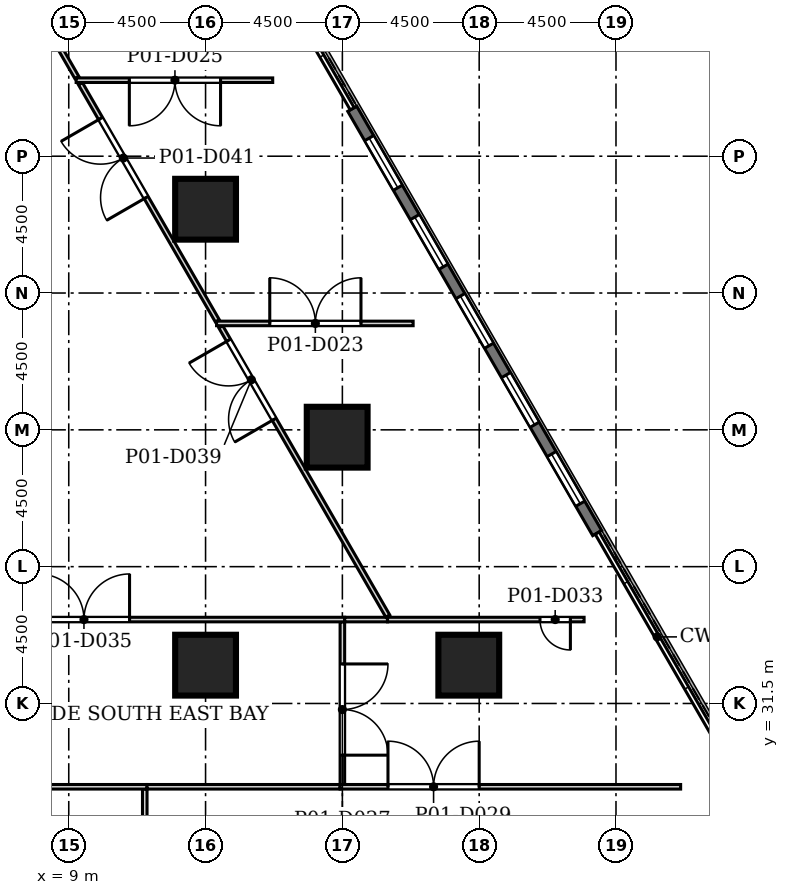
"""IFC4 building model, lengths in metres.
Left out: names, types, materials, properties, quantities, classifications, styles, units other than length and angle.
Written with IfcOpenShell. Run it as: python <this file> out.ifc"""

import sys

from ifc_helpers import new_model, si_unit, direction, frame, frame_2d, origin, origin_2d, place, context, subcontext, project, spatial, rectangle, extrude, element, fill, save


model = new_model("IFC4")
c1 = context("Model", 3, precision=1e-05, world=origin(), true_north=direction((0.0, 1.0)))
c2 = subcontext(c1, "Body", "Model", "MODEL_VIEW")
j1 = project(units=[si_unit("LENGTHUNIT", "METRE"), si_unit("PLANEANGLEUNIT", "RADIAN")], contexts=[c1])
p1 = place(None, origin())
s1 = spatial("IfcSite", under=j1, at=p1, CompositionType="ELEMENT")
p2 = place(p1, origin())
s2 = spatial("IfcBuilding", under=s1, at=p2, CompositionType="ELEMENT")
p3 = place(p2, frame((0.0, 0.0, 8.0)))
s3 = spatial("IfcBuildingStorey", under=s2, at=p3, CompositionType="ELEMENT", Elevation=8.0)
for number, where, z_axis, x_axis in (
    (1, (22.158, 32.76, 0.0), (0.0, 0.0, 1.0), (1.0, 0.0, 0.0)),
    (2, (13.5, 47.756, 0.0), (0.0, 0.0, 1.0), (1.0, 0.0, 0.0)),
    (3, (13.5, 32.76, 0.0), (0.0, 0.0, 1.0), (1.0, 0.0, 0.0)),
    (4, (17.829, 40.258, 0.0), (0.0, 0.0, 1.0), (1.0, 0.0, 0.0)),
):
    element("IfcColumn", number, at=place(p3, frame(where, z_axis=z_axis, x_axis=x_axis)), inside=s3, PredefinedType="COLUMN", context=c2, shape_type="SweptSolid", body=[
        extrude(rectangle(XDim=2.0, YDim=2.0, at=origin_2d()), origin(), (0.0, 0.0, 1.0), 6.0),
    ])
p4 = place(p3, frame((26.382, 37.104, 0.0), z_axis=(0.0, 0.0, 1.0), x_axis=(-0.500003967864, 0.866023112925, 0.0)))
e5 = element("IfcWall", 5, at=p4, inside=s3, PredefinedType="SOLIDWALL", context=c2, shape_type="SweptSolid", body=[
    extrude(rectangle(XDim=16.115, YDim=0.34, at=frame_2d((8.058, 0.0))), origin(), (0.0, 0.0, 1.0), 5.7),
])
p5 = place(p4, frame((1.115, 0.0, 0.9)))
e6 = element("IfcOpeningElement", 6, at=p5, cuts=e5, PredefinedType="OPENING", context=c2, shape_type="SweptSolid", body=[
    extrude(rectangle(XDim=1.885, YDim=3.5, at=frame_2d((0.942, 1.75))), frame((0.0, 0.18, 0.0), z_axis=(0.0, -1.0, 0.0), x_axis=(1.0, 0.0, 0.0)), (0.0, 0.0, 1.0), 0.36),
])
p6 = place(p4, frame((4.115, 0.0, 0.9)))
e7 = element("IfcOpeningElement", 7, at=p6, cuts=e5, PredefinedType="OPENING", context=c2, shape_type="SweptSolid", body=[
    extrude(rectangle(XDim=1.885, YDim=3.5, at=frame_2d((0.942, 1.75))), frame((0.0, 0.18, 0.0), z_axis=(0.0, -1.0, 0.0), x_axis=(1.0, 0.0, 0.0)), (0.0, 0.0, 1.0), 0.36),
])
p7 = place(p4, frame((7.115, 0.0, 0.9)))
e8 = element("IfcOpeningElement", 8, at=p7, cuts=e5, PredefinedType="OPENING", context=c2, shape_type="SweptSolid", body=[
    extrude(rectangle(XDim=1.885, YDim=3.5, at=frame_2d((0.942, 1.75))), frame((0.0, 0.18, 0.0), z_axis=(0.0, -1.0, 0.0), x_axis=(1.0, 0.0, 0.0)), (0.0, 0.0, 1.0), 0.36),
])
p8 = place(p4, frame((10.115, 0.0, 0.9)))
e9 = element("IfcOpeningElement", 9, at=p8, cuts=e5, PredefinedType="OPENING", context=c2, shape_type="SweptSolid", body=[
    extrude(rectangle(XDim=1.885, YDim=3.5, at=frame_2d((0.942, 1.75))), frame((0.0, 0.18, 0.0), z_axis=(0.0, -1.0, 0.0), x_axis=(1.0, 0.0, 0.0)), (0.0, 0.0, 1.0), 0.36),
])
p9 = place(p4, frame((13.115, 0.0, 0.9)))
e10 = element("IfcOpeningElement", 10, at=p9, cuts=e5, PredefinedType="OPENING", context=c2, shape_type="SweptSolid", body=[
    extrude(rectangle(XDim=1.885, YDim=3.5, at=frame_2d((0.942, 1.75))), frame((0.0, 0.18, 0.0), z_axis=(0.0, -1.0, 0.0), x_axis=(1.0, 0.0, 0.0)), (0.0, 0.0, 1.0), 0.36),
])
p10 = place(p3, frame((11.5, 28.685, 0.0), z_axis=(0.0, 0.0, 1.0), x_axis=(0.0, -1.0, 0.0)))
e11 = element("IfcWall", 11, at=p10, inside=s3, PredefinedType="PARTITIONING", context=c2, shape_type="SweptSolid", body=[
    extrude(rectangle(XDim=5.76, YDim=0.15, at=frame_2d((2.88, 0.0))), origin(), (0.0, 0.0, 1.0), 5.7),
])
p11 = place(p10, frame((1.185, 0.0, 0.0)))
e12 = element("IfcOpeningElement", 12, at=p11, cuts=e11, PredefinedType="OPENING", context=c2, shape_type="SweptSolid", body=[
    extrude(rectangle(XDim=3.0, YDim=2.4, at=frame_2d((1.5, 1.2))), frame((0.0, 0.085, 0.0), z_axis=(0.0, -1.0, 0.0), x_axis=(1.0, 0.0, 0.0)), (0.0, 0.0, 1.0), 0.17),
])
p12 = place(p3, frame((4.105, 28.76, 0.0), z_axis=(0.0, 0.0, 1.0), x_axis=(1.0, 0.0, 0.0)))
e13 = element("IfcWall", 13, at=p12, inside=s3, PredefinedType="PARTITIONING", context=c2, shape_type="SweptSolid", body=[
    extrude(rectangle(XDim=7.47, YDim=0.15, at=frame_2d((3.735, 0.0))), origin(), (0.0, 0.0, 1.0), 5.7),
])
p13 = place(p12, frame((0.395, 0.0, 0.0)))
e14 = element("IfcOpeningElement", 14, at=p13, cuts=e13, PredefinedType="OPENING", context=c2, shape_type="SweptSolid", body=[
    extrude(rectangle(XDim=3.0, YDim=2.4, at=frame_2d((1.5, 1.2))), frame((0.0, 0.085, 0.0), z_axis=(0.0, -1.0, 0.0), x_axis=(1.0, 0.0, 0.0)), (0.0, 0.0, 1.0), 0.17),
])
p14 = place(p3, frame((11.575, 28.76, 0.0), z_axis=(0.0, 0.0, 1.0), x_axis=(1.0, 0.0, 0.0)))
e15 = element("IfcWall", 15, at=p14, inside=s3, PredefinedType="PARTITIONING", context=c2, shape_type="SweptSolid", body=[
    extrude(rectangle(XDim=6.35, YDim=0.15, at=frame_2d((3.175, 0.0))), origin(), (0.0, 0.0, 1.0), 5.7),
])
p15 = place(p3, frame((17.925, 28.76, 0.0), z_axis=(0.0, 0.0, 1.0), x_axis=(1.0, 0.0, 0.0)))
e16 = element("IfcWall", 16, at=p15, inside=s3, PredefinedType="PARTITIONING", context=c2, shape_type="SweptSolid", body=[
    extrude(rectangle(XDim=11.201, YDim=0.15, at=frame_2d((5.601, 0.0))), origin(), (0.0, 0.0, 1.0), 5.7),
])
p16 = place(p15, frame((1.575, 0.0, 0.0)))
e17 = element("IfcOpeningElement", 17, at=p16, cuts=e16, PredefinedType="OPENING", context=c2, shape_type="SweptSolid", body=[
    extrude(rectangle(XDim=3.0, YDim=2.4, at=frame_2d((1.5, 1.2))), frame((0.0, 0.085, 0.0), z_axis=(0.0, -1.0, 0.0), x_axis=(1.0, 0.0, 0.0)), (0.0, 0.0, 1.0), 0.17),
])
p17 = place(p3, frame((18.0, 28.835, 0.0), z_axis=(0.0, 0.0, 1.0), x_axis=(0.0, 1.0, 0.0)))
e18 = element("IfcWall", 18, at=p17, inside=s3, PredefinedType="PARTITIONING", context=c2, shape_type="SweptSolid", body=[
    extrude(rectangle(XDim=5.35, YDim=0.15, at=frame_2d((2.675, 0.0))), origin(), (0.0, 0.0, 1.0), 5.7),
])
p18 = place(p17, frame((0.965, 0.0, 0.0)))
e19 = element("IfcOpeningElement", 19, at=p18, cuts=e18, PredefinedType="OPENING", context=c2, shape_type="SweptSolid", body=[
    extrude(rectangle(XDim=3.0, YDim=2.4, at=frame_2d((1.5, 1.2))), frame((0.0, 0.085, 0.0), z_axis=(0.0, -1.0, 0.0), x_axis=(1.0, 0.0, 0.0)), (0.0, 0.0, 1.0), 0.17),
])
p19 = place(p3, frame((18.075, 34.26, 0.0), z_axis=(0.0, 0.0, 1.0), x_axis=(-1.0, 0.0, 0.0)))
e20 = element("IfcWall", 20, at=p19, inside=s3, PredefinedType="PARTITIONING", context=c2, shape_type="SweptSolid", body=[
    extrude(rectangle(XDim=13.97, YDim=0.15, at=frame_2d((6.985, 0.0))), origin(), (0.0, 0.0, 1.0), 5.7),
])
p20 = place(p19, frame((7.075, 0.0, 0.0)))
e21 = element("IfcOpeningElement", 21, at=p20, cuts=e20, PredefinedType="OPENING", context=c2, shape_type="SweptSolid", body=[
    extrude(rectangle(XDim=3.0, YDim=2.4, at=frame_2d((1.5, 1.2))), frame((0.0, 0.085, 0.0), z_axis=(0.0, -1.0, 0.0), x_axis=(1.0, 0.0, 0.0)), (0.0, 0.0, 1.0), 0.17),
])
p21 = place(p19, frame((10.575, 0.0, 0.0)))
e22 = element("IfcOpeningElement", 22, at=p21, cuts=e20, PredefinedType="OPENING", context=c2, shape_type="SweptSolid", body=[
    extrude(rectangle(XDim=3.0, YDim=2.4, at=frame_2d((1.5, 1.2))), frame((0.0, 0.085, 0.0), z_axis=(0.0, -1.0, 0.0), x_axis=(1.0, 0.0, 0.0)), (0.0, 0.0, 1.0), 0.17),
])
p22 = place(p3, frame((19.485, 34.26, 0.0), z_axis=(0.0, 0.0, 1.0), x_axis=(-1.0, 0.0, 0.0)))
e23 = element("IfcWall", 23, at=p22, inside=s3, PredefinedType="PARTITIONING", context=c2, shape_type="SweptSolid", body=[
    extrude(rectangle(XDim=1.41, YDim=0.15, at=frame_2d((0.705, 0.0))), origin(), (0.0, 0.0, 1.0), 5.7),
])
p23 = place(p3, frame((19.485, 34.26, 0.0), z_axis=(0.0, 0.0, 1.0), x_axis=(1.0, 0.0, 0.0)))
e24 = element("IfcWall", 24, at=p23, inside=s3, PredefinedType="PARTITIONING", context=c2, shape_type="SweptSolid", body=[
    extrude(rectangle(XDim=6.466, YDim=0.15, at=frame_2d((3.233, 0.0))), origin(), (0.0, 0.0, 1.0), 5.7),
])
p24 = place(p23, frame((5.015, 0.0, 0.0)))
e25 = element("IfcOpeningElement", 25, at=p24, cuts=e24, PredefinedType="OPENING", context=c2, shape_type="SweptSolid", body=[
    extrude(rectangle(XDim=1.0, YDim=2.1, at=frame_2d((0.5, 1.05))), frame((0.0, 0.085, 0.0), z_axis=(0.0, -1.0, 0.0), x_axis=(1.0, 0.0, 0.0)), (0.0, 0.0, 1.0), 0.17),
])
p25 = place(p3, frame((14.001, 43.887, 0.0), z_axis=(0.0, 0.0, 1.0), x_axis=(0.500006534994, -0.866021630771, 0.0)))
e26 = element("IfcWall", 26, at=p25, inside=s3, PredefinedType="PARTITIONING", context=c2, shape_type="SweptSolid", body=[
    extrude(rectangle(XDim=10.985, YDim=0.15, at=frame_2d((5.493, 0.0))), origin(), (0.0, 0.0, 1.0), 5.7),
])
p26 = place(p25, frame((0.511, 0.0, 0.0)))
e27 = element("IfcOpeningElement", 27, at=p26, cuts=e26, PredefinedType="OPENING", context=c2, shape_type="SweptSolid", body=[
    extrude(rectangle(XDim=3.0, YDim=2.4, at=frame_2d((1.5, 1.2))), frame((0.0, 0.085, 0.0), z_axis=(0.0, -1.0, 0.0), x_axis=(1.0, 0.0, 0.0)), (0.0, 0.0, 1.0), 0.17),
])
p27 = place(p3, frame((13.861, 44.0, 0.0), z_axis=(0.0, 0.0, 1.0), x_axis=(1.0, 0.0, 0.0)))
e28 = element("IfcWall", 28, at=p27, inside=s3, PredefinedType="PARTITIONING", context=c2, shape_type="SweptSolid", body=[
    extrude(rectangle(XDim=6.466, YDim=0.15, at=frame_2d((3.233, 0.0))), origin(), (0.0, 0.0, 1.0), 5.7),
])
p28 = place(p27, frame((1.75, 0.0, 0.0)))
e29 = element("IfcOpeningElement", 29, at=p28, cuts=e28, PredefinedType="OPENING", context=c2, shape_type="SweptSolid", body=[
    extrude(rectangle(XDim=3.0, YDim=2.4, at=frame_2d((1.5, 1.2))), frame((0.0, 0.085, 0.0), z_axis=(0.0, -1.0, 0.0), x_axis=(1.0, 0.0, 0.0)), (0.0, 0.0, 1.0), 0.17),
])
p29 = place(p3, frame((9.383, 51.887, 0.0), z_axis=(0.0, 0.0, 1.0), x_axis=(0.499987617168, -0.866032552898, 0.0)))
e30 = element("IfcWall", 30, at=p29, inside=s3, PredefinedType="PARTITIONING", context=c2, shape_type="SweptSolid", body=[
    extrude(rectangle(XDim=9.006, YDim=0.15, at=frame_2d((4.503, 0.0))), origin(), (0.0, 0.0, 1.0), 5.7),
])
p30 = place(p29, frame((1.326, 0.0, 0.0)))
e31 = element("IfcOpeningElement", 31, at=p30, cuts=e30, PredefinedType="OPENING", context=c2, shape_type="SweptSolid", body=[
    extrude(rectangle(XDim=3.0, YDim=2.4, at=frame_2d((1.5, 1.2))), frame((0.0, 0.085, 0.0), z_axis=(0.0, -1.0, 0.0), x_axis=(1.0, 0.0, 0.0)), (0.0, 0.0, 1.0), 0.17),
])
p31 = place(p3, frame((9.242, 52.0, 0.0), z_axis=(0.0, 0.0, 1.0), x_axis=(1.0, 0.0, 0.0)))
e32 = element("IfcWall", 32, at=p31, inside=s3, PredefinedType="PARTITIONING", context=c2, shape_type="SweptSolid", body=[
    extrude(rectangle(XDim=6.466, YDim=0.15, at=frame_2d((3.233, 0.0))), origin(), (0.0, 0.0, 1.0), 5.7),
])
p32 = place(p31, frame((1.75, 0.0, 0.0)))
e33 = element("IfcOpeningElement", 33, at=p32, cuts=e32, PredefinedType="OPENING", context=c2, shape_type="SweptSolid", body=[
    extrude(rectangle(XDim=3.0, YDim=2.4, at=frame_2d((1.5, 1.2))), frame((0.0, 0.085, 0.0), z_axis=(0.0, -1.0, 0.0), x_axis=(1.0, 0.0, 0.0)), (0.0, 0.0, 1.0), 0.17),
])
p33 = place(p3, frame((7.925, 54.412, 0.0), z_axis=(0.0, 0.0, 1.0), x_axis=(0.499906209203, -0.866079547155, 0.0)))
e34 = element("IfcWall", 34, at=p33, inside=s3, PredefinedType="PARTITIONING", context=c2, shape_type="SweptSolid", body=[
    extrude(rectangle(XDim=2.684, YDim=0.15, at=frame_2d((1.342, 0.0))), origin(), (0.0, 0.0, 1.0), 5.7),
])
p34 = place(p5, origin())
e35 = element("IfcWindow", 35, at=p34, inside=s3, PartitioningType="SINGLE_PANEL", PredefinedType="WINDOW", context=c2, shape_type="SweptSolid", body=[
    extrude(rectangle(XDim=1.885, YDim=3.5, at=frame_2d((0.942, 1.75))), frame((0.0, 0.11, 0.0), z_axis=(0.0, -1.0, 0.0), x_axis=(1.0, 0.0, 0.0)), (0.0, 0.0, 1.0), 0.06),
])
fill(e6, e35)
p35 = place(p6, origin())
e36 = element("IfcWindow", 36, at=p35, inside=s3, PartitioningType="SINGLE_PANEL", PredefinedType="WINDOW", context=c2, shape_type="SweptSolid", body=[
    extrude(rectangle(XDim=1.885, YDim=3.5, at=frame_2d((0.942, 1.75))), frame((0.0, 0.11, 0.0), z_axis=(0.0, -1.0, 0.0), x_axis=(1.0, 0.0, 0.0)), (0.0, 0.0, 1.0), 0.06),
])
fill(e7, e36)
p36 = place(p7, origin())
e37 = element("IfcWindow", 37, at=p36, inside=s3, PartitioningType="SINGLE_PANEL", PredefinedType="WINDOW", context=c2, shape_type="SweptSolid", body=[
    extrude(rectangle(XDim=1.885, YDim=3.5, at=frame_2d((0.942, 1.75))), frame((0.0, 0.11, 0.0), z_axis=(0.0, -1.0, 0.0), x_axis=(1.0, 0.0, 0.0)), (0.0, 0.0, 1.0), 0.06),
])
fill(e8, e37)
p37 = place(p8, origin())
e38 = element("IfcWindow", 38, at=p37, inside=s3, PartitioningType="SINGLE_PANEL", PredefinedType="WINDOW", context=c2, shape_type="SweptSolid", body=[
    extrude(rectangle(XDim=1.885, YDim=3.5, at=frame_2d((0.942, 1.75))), frame((0.0, 0.11, 0.0), z_axis=(0.0, -1.0, 0.0), x_axis=(1.0, 0.0, 0.0)), (0.0, 0.0, 1.0), 0.06),
])
fill(e9, e38)
p38 = place(p9, origin())
e39 = element("IfcWindow", 39, at=p38, inside=s3, PartitioningType="SINGLE_PANEL", PredefinedType="WINDOW", context=c2, shape_type="SweptSolid", body=[
    extrude(rectangle(XDim=1.885, YDim=3.5, at=frame_2d((0.942, 1.75))), frame((0.0, 0.11, 0.0), z_axis=(0.0, -1.0, 0.0), x_axis=(1.0, 0.0, 0.0)), (0.0, 0.0, 1.0), 0.06),
])
fill(e10, e39)
p39 = place(p28, origin())
e40 = element("IfcDoor", 40, at=p39, inside=s3, OperationType="DOUBLE_DOOR_SINGLE_SWING", PredefinedType="DOOR", context=c2, shape_type="SweptSolid", body=[
    extrude(rectangle(XDim=3.0, YDim=2.4, at=frame_2d((1.5, 1.2))), frame((0.0, 0.025, 0.0), z_axis=(0.0, -1.0, 0.0), x_axis=(1.0, 0.0, 0.0)), (0.0, 0.0, 1.0), 0.05),
])
fill(e29, e40)
p40 = place(p32, frame((3.0, 0.0, 0.0), z_axis=(0.0, 0.0, 1.0), x_axis=(-1.0, 0.0, 0.0)))
e41 = element("IfcDoor", 41, at=p40, inside=s3, OperationType="DOUBLE_DOOR_SINGLE_SWING", PredefinedType="DOOR", context=c2, shape_type="SweptSolid", body=[
    extrude(rectangle(XDim=3.0, YDim=2.4, at=frame_2d((1.5, 1.2))), frame((0.0, 0.025, 0.0), z_axis=(0.0, -1.0, 0.0), x_axis=(1.0, 0.0, 0.0)), (0.0, 0.0, 1.0), 0.05),
])
fill(e33, e41)
p41 = place(p18, frame((3.0, 0.0, 0.0), z_axis=(0.0, 0.0, 1.0), x_axis=(-1.0, 0.0, 0.0)))
e42 = element("IfcDoor", 42, at=p41, inside=s3, OperationType="DOUBLE_DOOR_SINGLE_SWING", PredefinedType="DOOR", context=c2, shape_type="SweptSolid", body=[
    extrude(rectangle(XDim=3.0, YDim=2.4, at=frame_2d((1.5, 1.2))), frame((0.0, 0.025, 0.0), z_axis=(0.0, -1.0, 0.0), x_axis=(1.0, 0.0, 0.0)), (0.0, 0.0, 1.0), 0.05),
])
fill(e19, e42)
p42 = place(p16, origin())
e43 = element("IfcDoor", 43, at=p42, inside=s3, OperationType="DOUBLE_DOOR_SINGLE_SWING", PredefinedType="DOOR", context=c2, shape_type="SweptSolid", body=[
    extrude(rectangle(XDim=3.0, YDim=2.4, at=frame_2d((1.5, 1.2))), frame((0.0, 0.025, 0.0), z_axis=(0.0, -1.0, 0.0), x_axis=(1.0, 0.0, 0.0)), (0.0, 0.0, 1.0), 0.05),
])
fill(e17, e43)
p43 = place(p24, frame((1.0, 0.0, 0.0), z_axis=(0.0, 0.0, 1.0), x_axis=(-1.0, 0.0, 0.0)))
e44 = element("IfcDoor", 44, at=p43, inside=s3, OperationType="SINGLE_SWING_LEFT", PredefinedType="DOOR", context=c2, shape_type="SweptSolid", body=[
    extrude(rectangle(XDim=1.0, YDim=2.1, at=frame_2d((0.5, 1.05))), frame((0.0, 0.025, 0.0), z_axis=(0.0, -1.0, 0.0), x_axis=(1.0, 0.0, 0.0)), (0.0, 0.0, 1.0), 0.05),
])
fill(e25, e44)
p44 = place(p20, frame((3.0, 0.0, 0.0), z_axis=(0.0, 0.0, 1.0), x_axis=(-1.0, 0.0, 0.0)))
e45 = element("IfcDoor", 45, at=p44, inside=s3, OperationType="DOUBLE_DOOR_SINGLE_SWING", PredefinedType="DOOR", context=c2, shape_type="SweptSolid", body=[
    extrude(rectangle(XDim=3.0, YDim=2.4, at=frame_2d((1.5, 1.2))), frame((0.0, 0.025, 0.0), z_axis=(0.0, -1.0, 0.0), x_axis=(1.0, 0.0, 0.0)), (0.0, 0.0, 1.0), 0.05),
])
fill(e21, e45)
p45 = place(p26, frame((3.0, 0.0, 0.0), z_axis=(0.0, 0.0, 1.0), x_axis=(-1.0, 0.0, 0.0)))
e46 = element("IfcDoor", 46, at=p45, inside=s3, OperationType="DOUBLE_DOOR_SINGLE_SWING", PredefinedType="DOOR", context=c2, shape_type="SweptSolid", body=[
    extrude(rectangle(XDim=3.0, YDim=2.4, at=frame_2d((1.5, 1.2))), frame((0.0, 0.025, 0.0), z_axis=(0.0, -1.0, 0.0), x_axis=(1.0, 0.0, 0.0)), (0.0, 0.0, 1.0), 0.05),
])
fill(e27, e46)
p46 = place(p30, frame((3.0, 0.0, 0.0), z_axis=(0.0, 0.0, 1.0), x_axis=(-1.0, 0.0, 0.0)))
e47 = element("IfcDoor", 47, at=p46, inside=s3, OperationType="DOUBLE_DOOR_SINGLE_SWING", PredefinedType="DOOR", context=c2, shape_type="SweptSolid", body=[
    extrude(rectangle(XDim=3.0, YDim=2.4, at=frame_2d((1.5, 1.2))), frame((0.0, 0.025, 0.0), z_axis=(0.0, -1.0, 0.0), x_axis=(1.0, 0.0, 0.0)), (0.0, 0.0, 1.0), 0.05),
])
fill(e31, e47)
save(model, sys.argv[1])
